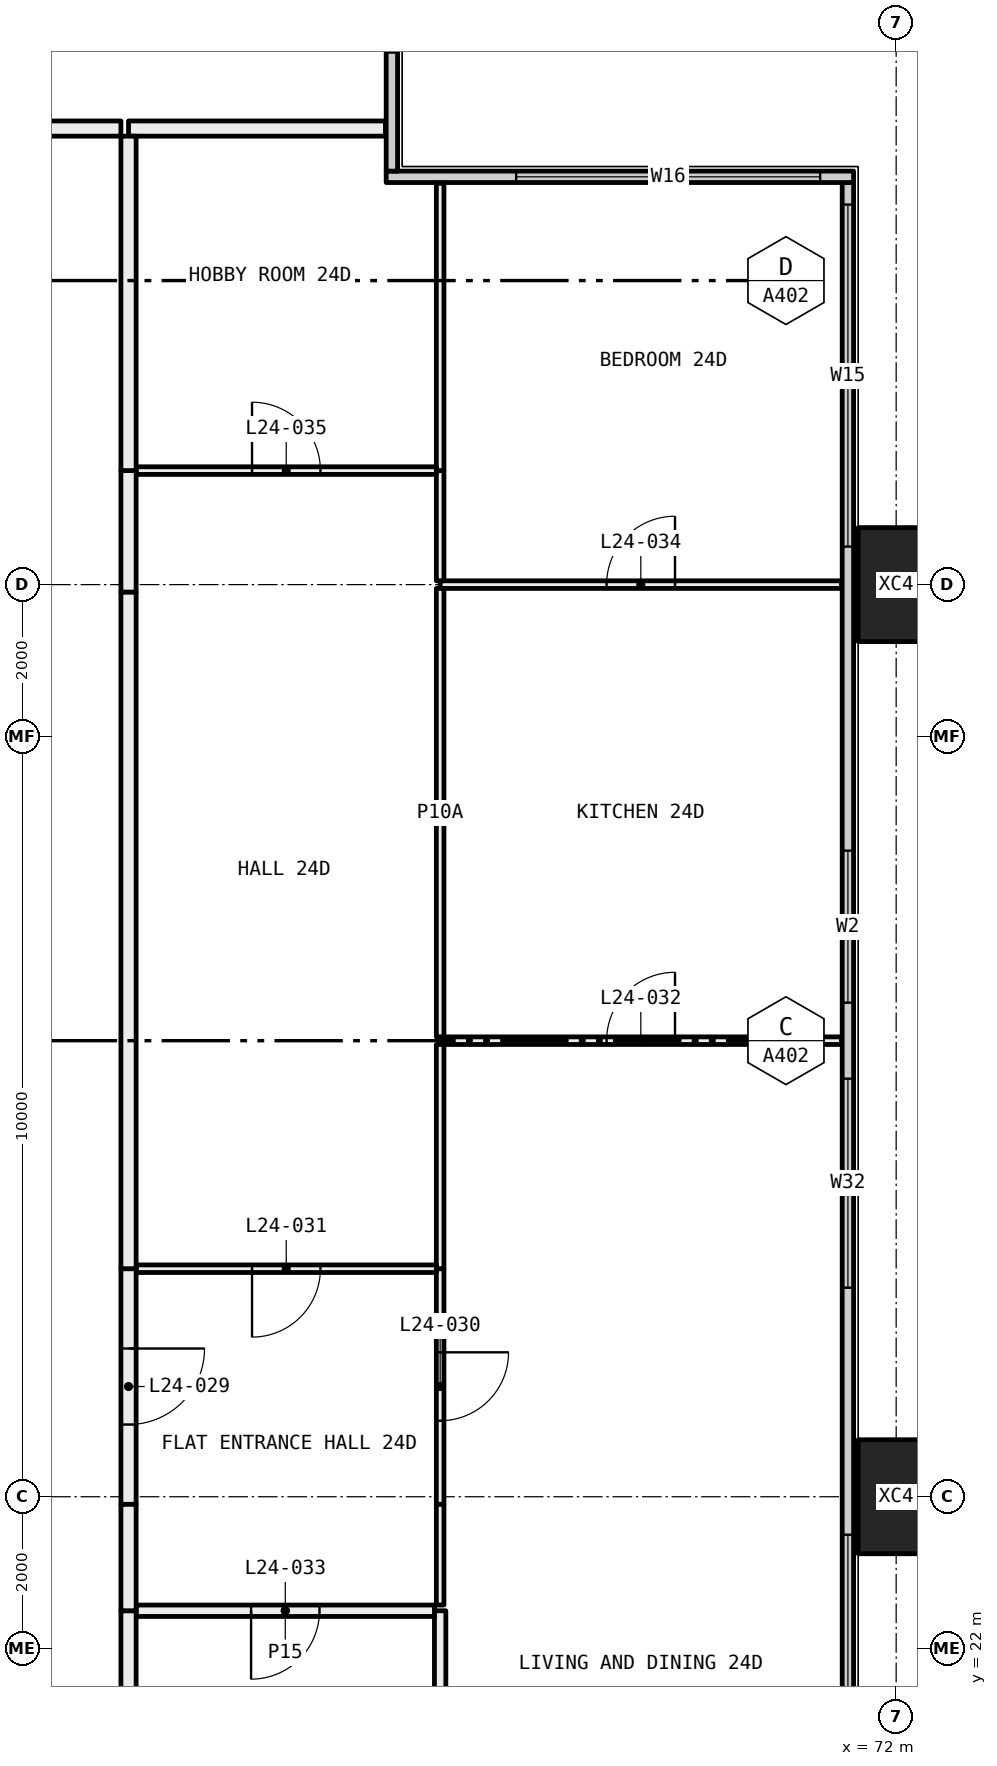
"""IFC4 building model, lengths in metres.
Left out: names, types, materials, properties, quantities, classifications, styles, units other than length and angle.
Written with IfcOpenShell. Run it as: python <this file> out.ifc"""

import sys

from ifc_helpers import new_model, si_unit, direction, frame, frame_2d, origin, origin_2d, place, context, subcontext, project, spatial, rectangle, hollow_rectangle, extrude, element, fill, save


model = new_model("IFC4")
c1 = context("Model", 3, precision=1e-05, world=origin(), true_north=direction((0.0, 1.0)))
c2 = subcontext(c1, "Body", "Model", "MODEL_VIEW")
j1 = project(units=[si_unit("LENGTHUNIT", "METRE"), si_unit("PLANEANGLEUNIT", "RADIAN")], contexts=[c1])
p1 = place(None, origin())
s1 = spatial("IfcSite", under=j1, at=p1, CompositionType="ELEMENT")
p2 = place(p1, origin())
s2 = spatial("IfcBuilding", under=s1, at=p2, CompositionType="ELEMENT")
p3 = place(p2, frame((0.0, 0.0, 96.6)))
s3 = spatial("IfcBuildingStorey", under=s2, at=p3, CompositionType="ELEMENT", Elevation=96.6)
for number, where, z_axis, x_axis in (
    (1, (72.0, 24.0, -0.4), (0.0, 0.0, 1.0), (0.0, 1.0, 0.0)),
    (2, (72.0, 36.0, -0.4), (0.0, 0.0, 1.0), (0.0, 1.0, 0.0)),
):
    element("IfcColumn", number, at=place(p3, frame(where, z_axis=z_axis, x_axis=x_axis)), inside=s3, PredefinedType="COLUMN", context=c2, shape_type="SweptSolid", body=[
        extrude(hollow_rectangle(XDim=1.5, YDim=1.0, WallThickness=0.06, at=origin_2d()), origin(), (0.0, 0.0, 1.0), 3.45),
    ])
p4 = place(p3, frame((71.365, 18.71, 0.0), z_axis=(0.0, 0.0, 1.0), x_axis=(0.0, 1.0, 0.0)))
e3 = element("IfcWall", 3, at=p4, inside=s3, PredefinedType="ELEMENTEDWALL", context=c2, shape_type="SweptSolid", body=[
    extrude(rectangle(XDim=22.58, YDim=0.15, at=frame_2d((11.29, 0.0))), origin(), (0.0, 0.0, 1.0), 3.05),
])
p5 = place(p4, frame((0.29, 0.0, 0.45)))
e4 = element("IfcOpeningElement", 4, at=p5, cuts=e3, PredefinedType="OPENING", context=c2, shape_type="SweptSolid", body=[
    extrude(rectangle(XDim=4.5, YDim=2.55, at=frame_2d((2.25, 1.275))), frame((0.0, 0.085, 0.0), z_axis=(0.0, -1.0, 0.0), x_axis=(1.0, 0.0, 0.0)), (0.0, 0.0, 1.0), 0.17),
])
p6 = place(p4, frame((8.04, 0.0, 0.45)))
e5 = element("IfcOpeningElement", 5, at=p6, cuts=e3, PredefinedType="OPENING", context=c2, shape_type="SweptSolid", body=[
    extrude(rectangle(XDim=2.75, YDim=2.55, at=frame_2d((1.375, 1.275))), frame((0.0, 0.085, 0.0), z_axis=(0.0, -1.0, 0.0), x_axis=(1.0, 0.0, 0.0)), (0.0, 0.0, 1.0), 0.17),
])
p7 = place(p4, frame((11.79, 0.0, 0.45)))
e6 = element("IfcOpeningElement", 6, at=p7, cuts=e3, PredefinedType="OPENING", context=c2, shape_type="SweptSolid", body=[
    extrude(rectangle(XDim=2.0, YDim=2.55, at=frame_2d((1.0, 1.275))), frame((0.0, 0.085, 0.0), z_axis=(0.0, -1.0, 0.0), x_axis=(1.0, 0.0, 0.0)), (0.0, 0.0, 1.0), 0.17),
])
p8 = place(p4, frame((17.79, 0.0, 0.45)))
e7 = element("IfcOpeningElement", 7, at=p8, cuts=e3, PredefinedType="OPENING", context=c2, shape_type="SweptSolid", body=[
    extrude(rectangle(XDim=4.5, YDim=2.55, at=frame_2d((2.25, 1.275))), frame((0.0, 0.085, 0.0), z_axis=(0.0, -1.0, 0.0), x_axis=(1.0, 0.0, 0.0)), (0.0, 0.0, 1.0), 0.17),
])
p9 = place(p3, frame((65.29, 41.365, 0.0), z_axis=(0.0, 0.0, 1.0), x_axis=(1.0, 0.0, 0.0)))
e8 = element("IfcWall", 8, at=p9, inside=s3, PredefinedType="ELEMENTEDWALL", context=c2, shape_type="SweptSolid", body=[
    extrude(rectangle(XDim=6.15, YDim=0.15, at=frame_2d((3.075, 0.0))), origin(), (0.0, 0.0, 1.0), 3.05),
])
p10 = place(p9, frame((1.71, 0.0, 0.45)))
e9 = element("IfcOpeningElement", 9, at=p10, cuts=e8, PredefinedType="OPENING", context=c2, shape_type="SweptSolid", body=[
    extrude(rectangle(XDim=4.0, YDim=2.55, at=frame_2d((2.0, 1.275))), frame((0.0, 0.085, 0.0), z_axis=(0.0, -1.0, 0.0), x_axis=(1.0, 0.0, 0.0)), (0.0, 0.0, 1.0), 0.17),
])
p11 = place(p3, frame((65.365, 41.44, 0.0), z_axis=(0.0, 0.0, 1.0), x_axis=(0.0, 1.0, 0.0)))
e10 = element("IfcWall", 10, at=p11, inside=s3, PredefinedType="ELEMENTEDWALL", context=c2, shape_type="SweptSolid", body=[
    extrude(rectangle(XDim=5.85, YDim=0.15, at=frame_2d((2.925, 0.0))), origin(), (0.0, 0.0, 1.0), 3.05),
])
p12 = place(p11, frame((1.56, 0.0, 0.45)))
e11 = element("IfcOpeningElement", 11, at=p12, cuts=e10, PredefinedType="OPENING", context=c2, shape_type="SweptSolid", body=[
    extrude(rectangle(XDim=4.0, YDim=2.55, at=frame_2d((2.0, 1.275))), frame((0.0, 0.085, 0.0), z_axis=(0.0, -1.0, 0.0), x_axis=(1.0, 0.0, 0.0)), (0.0, 0.0, 1.0), 0.17),
])
p13 = place(p3, frame((71.28, 30.0, 0.0), z_axis=(0.0, 0.0, 1.0), x_axis=(-1.0, 0.0, 0.0)))
e12 = element("IfcWall", 12, at=p13, inside=s3, PredefinedType="PARTITIONING", context=c2, shape_type="SweptSolid", body=[
    extrude(rectangle(XDim=5.28, YDim=0.1, at=frame_2d((2.64, 0.0))), origin(), (0.0, 0.0, 1.0), 3.05),
])
p14 = place(p13, frame((2.19, 0.0, 0.0)))
e13 = element("IfcOpeningElement", 13, at=p14, cuts=e12, PredefinedType="OPENING", context=c2, shape_type="SweptSolid", body=[
    extrude(rectangle(XDim=0.9, YDim=2.1, at=frame_2d((0.45, 1.05))), frame((0.0, 0.06, 0.0), z_axis=(0.0, -1.0, 0.0), x_axis=(1.0, 0.0, 0.0)), (0.0, 0.0, 1.0), 0.12),
])
p15 = place(p3, frame((66.0, 22.5, 0.0), z_axis=(0.0, 0.0, 1.0), x_axis=(0.0, -1.0, 0.0)))
e14 = element("IfcWall", 14, at=p15, inside=s3, PredefinedType="PARTITIONING", context=c2, shape_type="SweptSolid", body=[
    extrude(rectangle(XDim=3.78, YDim=0.15, at=frame_2d((1.89, 0.0))), origin(), (0.0, 0.0, 1.0), 3.05),
])
p16 = place(p3, frame((66.0, 27.0, 0.0), z_axis=(0.0, 0.0, 1.0), x_axis=(0.0, -1.0, 0.0)))
e15 = element("IfcWall", 15, at=p16, inside=s3, PredefinedType="PARTITIONING", context=c2, shape_type="SweptSolid", body=[
    extrude(rectangle(XDim=3.1, YDim=0.1, at=frame_2d((1.55, 0.0))), origin(), (0.0, 0.0, 1.0), 2.45),
])
p17 = place(p16, frame((1.1, 0.0, 0.0)))
e16 = element("IfcOpeningElement", 16, at=p17, cuts=e15, PredefinedType="OPENING", context=c2, shape_type="SweptSolid", body=[
    extrude(rectangle(XDim=0.9, YDim=2.1, at=frame_2d((0.45, 1.05))), frame((0.0, 0.06, 0.0), z_axis=(0.0, -1.0, 0.0), x_axis=(1.0, 0.0, 0.0)), (0.0, 0.0, 1.0), 0.12),
])
p18 = place(p3, frame((66.0, 23.9, 0.0), z_axis=(0.0, 0.0, 1.0), x_axis=(0.0, -1.0, 0.0)))
e17 = element("IfcWall", 17, at=p18, inside=s3, PredefinedType="PARTITIONING", context=c2, shape_type="SweptSolid", body=[
    extrude(rectangle(XDim=1.325, YDim=0.1, at=frame_2d((0.663, 0.0))), origin(), (0.0, 0.0, 1.0), 3.05),
])
p19 = place(p3, frame((66.0, 29.95, 0.0), z_axis=(0.0, 0.0, 1.0), x_axis=(0.0, -1.0, 0.0)))
e18 = element("IfcWall", 18, at=p19, inside=s3, PredefinedType="PARTITIONING", context=c2, shape_type="SweptSolid", body=[
    extrude(rectangle(XDim=2.95, YDim=0.1, at=frame_2d((1.475, 0.0))), origin(), (0.0, 0.0, 1.0), 3.05),
])
p20 = place(p3, frame((71.28, 36.0, 0.0), z_axis=(0.0, 0.0, 1.0), x_axis=(-1.0, 0.0, 0.0)))
e19 = element("IfcWall", 19, at=p20, inside=s3, PredefinedType="PARTITIONING", context=c2, shape_type="SweptSolid", body=[
    extrude(rectangle(XDim=5.28, YDim=0.1, at=frame_2d((2.64, 0.0))), origin(), (0.0, 0.0, 1.0), 2.45),
])
p21 = place(p20, frame((2.19, 0.0, 0.0)))
e20 = element("IfcOpeningElement", 20, at=p21, cuts=e19, PredefinedType="OPENING", context=c2, shape_type="SweptSolid", body=[
    extrude(rectangle(XDim=0.9, YDim=2.1, at=frame_2d((0.45, 1.05))), frame((0.0, 0.06, 0.0), z_axis=(0.0, -1.0, 0.0), x_axis=(1.0, 0.0, 0.0)), (0.0, 0.0, 1.0), 0.12),
])
p22 = place(p3, frame((66.0, 35.95, 0.0), z_axis=(0.0, 0.0, 1.0), x_axis=(0.0, -1.0, 0.0)))
e21 = element("IfcWall", 21, at=p22, inside=s3, PredefinedType="PARTITIONING", context=c2, shape_type="SweptSolid", body=[
    extrude(rectangle(XDim=5.9, YDim=0.1, at=frame_2d((2.95, 0.0))), origin(), (0.0, 0.0, 1.0), 2.45),
])
p23 = place(p3, frame((66.0, 37.5, 0.0), z_axis=(0.0, 0.0, 1.0), x_axis=(0.0, -1.0, 0.0)))
e22 = element("IfcWall", 22, at=p23, inside=s3, PredefinedType="PARTITIONING", context=c2, shape_type="SweptSolid", body=[
    extrude(rectangle(XDim=1.45, YDim=0.1, at=frame_2d((0.725, 0.0))), origin(), (0.0, 0.0, 1.0), 2.45),
])
p24 = place(p3, frame((66.0, 41.28, 0.0), z_axis=(0.0, 0.0, 1.0), x_axis=(0.0, -1.0, 0.0)))
e23 = element("IfcWall", 23, at=p24, inside=s3, PredefinedType="PARTITIONING", context=c2, shape_type="SweptSolid", body=[
    extrude(rectangle(XDim=3.78, YDim=0.1, at=frame_2d((1.89, 0.0))), origin(), (0.0, 0.0, 1.0), 3.05),
])
p25 = place(p3, frame((65.925, 22.5, 0.0), z_axis=(0.0, 0.0, 1.0), x_axis=(-1.0, 0.0, 0.0)))
e24 = element("IfcWall", 24, at=p25, inside=s3, PredefinedType="PARTITIONING", context=c2, shape_type="SweptSolid", body=[
    extrude(rectangle(XDim=3.925, YDim=0.15, at=frame_2d((1.962, 0.0))), origin(), (0.0, 0.0, 1.0), 3.05),
])
p26 = place(p25, frame((1.512, 0.0, 0.0)))
e25 = element("IfcOpeningElement", 25, at=p26, cuts=e24, PredefinedType="OPENING", context=c2, shape_type="SweptSolid", body=[
    extrude(rectangle(XDim=0.9, YDim=2.1, at=frame_2d((0.45, 1.05))), frame((0.0, 0.085, 0.0), z_axis=(0.0, -1.0, 0.0), x_axis=(1.0, 0.0, 0.0)), (0.0, 0.0, 1.0), 0.17),
])
p27 = place(p3, frame((61.9, 22.5, 0.0), z_axis=(0.0, 0.0, 1.0), x_axis=(0.0, -1.0, 0.0)))
e26 = element("IfcWall", 26, at=p27, inside=s3, PredefinedType="PARTITIONING", context=c2, shape_type="SweptSolid", body=[
    extrude(rectangle(XDim=4.4, YDim=0.2, at=frame_2d((2.2, 0.0))), origin(), (0.0, 0.0, 1.0), 3.05),
])
p28 = place(p3, frame((65.95, 27.0, 0.0), z_axis=(0.0, 0.0, 1.0), x_axis=(-1.0, 0.0, 0.0)))
e27 = element("IfcWall", 27, at=p28, inside=s3, PredefinedType="PARTITIONING", context=c2, shape_type="SweptSolid", body=[
    extrude(rectangle(XDim=3.95, YDim=0.1, at=frame_2d((1.975, 0.0))), origin(), (0.0, 0.0, 1.0), 3.05),
])
p29 = place(p28, frame((1.525, 0.0, 0.0)))
e28 = element("IfcOpeningElement", 28, at=p29, cuts=e27, PredefinedType="OPENING", context=c2, shape_type="SweptSolid", body=[
    extrude(rectangle(XDim=0.9, YDim=2.1, at=frame_2d((0.45, 1.05))), frame((0.0, 0.06, 0.0), z_axis=(0.0, -1.0, 0.0), x_axis=(1.0, 0.0, 0.0)), (0.0, 0.0, 1.0), 0.12),
])
p30 = place(p3, frame((61.9, 27.0, 0.0), z_axis=(0.0, 0.0, 1.0), x_axis=(0.0, -1.0, 0.0)))
e29 = element("IfcWall", 29, at=p30, inside=s3, PredefinedType="PARTITIONING", context=c2, shape_type="SweptSolid", body=[
    extrude(rectangle(XDim=3.1, YDim=0.2, at=frame_2d((1.55, 0.0))), origin(), (0.0, 0.0, 1.0), 2.45),
])
p31 = place(p30, frame((1.05, 0.0, 0.0)))
e30 = element("IfcOpeningElement", 30, at=p31, cuts=e29, PredefinedType="OPENING", context=c2, shape_type="SweptSolid", body=[
    extrude(rectangle(XDim=1.0, YDim=2.1, at=frame_2d((0.5, 1.05))), frame((0.0, 0.11, 0.0), z_axis=(0.0, -1.0, 0.0), x_axis=(1.0, 0.0, 0.0)), (0.0, 0.0, 1.0), 0.22),
])
p32 = place(p3, frame((61.9, 23.9, 0.0), z_axis=(0.0, 0.0, 1.0), x_axis=(0.0, -1.0, 0.0)))
e31 = element("IfcWall", 31, at=p32, inside=s3, PredefinedType="PARTITIONING", context=c2, shape_type="SweptSolid", body=[
    extrude(rectangle(XDim=1.4, YDim=0.2, at=frame_2d((0.7, 0.0))), origin(), (0.0, 0.0, 1.0), 3.05),
])
p33 = place(p3, frame((65.95, 37.5, 0.0), z_axis=(0.0, 0.0, 1.0), x_axis=(-1.0, 0.0, 0.0)))
e32 = element("IfcWall", 32, at=p33, inside=s3, PredefinedType="PARTITIONING", context=c2, shape_type="SweptSolid", body=[
    extrude(rectangle(XDim=3.95, YDim=0.1, at=frame_2d((1.975, 0.0))), origin(), (0.0, 0.0, 1.0), 3.05),
])
p34 = place(p33, frame((1.525, 0.0, 0.0)))
e33 = element("IfcOpeningElement", 33, at=p34, cuts=e32, PredefinedType="OPENING", context=c2, shape_type="SweptSolid", body=[
    extrude(rectangle(XDim=0.9, YDim=2.1, at=frame_2d((0.45, 1.05))), frame((0.0, 0.06, 0.0), z_axis=(0.0, -1.0, 0.0), x_axis=(1.0, 0.0, 0.0)), (0.0, 0.0, 1.0), 0.12),
])
p35 = place(p3, frame((61.9, 37.5, 0.0), z_axis=(0.0, 0.0, 1.0), x_axis=(0.0, -1.0, 0.0)))
e34 = element("IfcWall", 34, at=p35, inside=s3, PredefinedType="PARTITIONING", context=c2, shape_type="SweptSolid", body=[
    extrude(rectangle(XDim=1.6, YDim=0.2, at=frame_2d((0.8, 0.0))), origin(), (0.0, 0.0, 1.0), 2.45),
])
p36 = place(p3, frame((61.9, 35.9, 0.0), z_axis=(0.0, 0.0, 1.0), x_axis=(0.0, -1.0, 0.0)))
e35 = element("IfcWall", 35, at=p36, inside=s3, PredefinedType="PARTITIONING", context=c2, shape_type="SweptSolid", body=[
    extrude(rectangle(XDim=8.9, YDim=0.2, at=frame_2d((4.45, 0.0))), origin(), (0.0, 0.0, 1.0), 3.05),
])
p37 = place(p3, frame((65.28, 42.0, 0.0), z_axis=(0.0, 0.0, 1.0), x_axis=(-1.0, 0.0, 0.0)))
e36 = element("IfcWall", 36, at=p37, inside=s3, PredefinedType="PARTITIONING", context=c2, shape_type="SweptSolid", body=[
    extrude(rectangle(XDim=3.38, YDim=0.2, at=frame_2d((1.69, 0.0))), origin(), (0.0, 0.0, 1.0), 3.05),
])
p38 = place(p3, frame((61.9, 41.9, 0.0), z_axis=(0.0, 0.0, 1.0), x_axis=(0.0, -1.0, 0.0)))
e37 = element("IfcWall", 37, at=p38, inside=s3, PredefinedType="PARTITIONING", context=c2, shape_type="SweptSolid", body=[
    extrude(rectangle(XDim=4.4, YDim=0.2, at=frame_2d((2.2, 0.0))), origin(), (0.0, 0.0, 1.0), 3.05),
])
p39 = place(p3, frame((60.0, 42.0, 0.0), z_axis=(0.0, 0.0, 1.0), x_axis=(1.0, 0.0, 0.0)))
e38 = element("IfcWall", 38, at=p39, inside=s3, PredefinedType="PARTITIONING", context=c2, shape_type="SweptSolid", body=[
    extrude(rectangle(XDim=1.8, YDim=0.2, at=frame_2d((0.9, 0.0))), origin(), (0.0, 0.0, 1.0), 3.05),
])
p40 = place(p5, origin())
e39 = element("IfcWindow", 39, at=p40, inside=s3, PartitioningType="SINGLE_PANEL", PredefinedType="WINDOW", context=c2, shape_type="SweptSolid", body=[
    extrude(rectangle(XDim=4.5, YDim=2.55, at=frame_2d((2.25, 1.275))), frame((0.0, 0.03, 0.0), z_axis=(0.0, -1.0, 0.0), x_axis=(1.0, 0.0, 0.0)), (0.0, 0.0, 1.0), 0.06),
])
fill(e4, e39)
p41 = place(p6, origin())
e40 = element("IfcWindow", 40, at=p41, inside=s3, PartitioningType="SINGLE_PANEL", PredefinedType="WINDOW", context=c2, shape_type="SweptSolid", body=[
    extrude(rectangle(XDim=2.75, YDim=2.55, at=frame_2d((1.375, 1.275))), frame((0.0, 0.03, 0.0), z_axis=(0.0, -1.0, 0.0), x_axis=(1.0, 0.0, 0.0)), (0.0, 0.0, 1.0), 0.06),
])
fill(e5, e40)
p42 = place(p7, origin())
e41 = element("IfcWindow", 41, at=p42, inside=s3, PartitioningType="SINGLE_PANEL", PredefinedType="WINDOW", context=c2, shape_type="SweptSolid", body=[
    extrude(rectangle(XDim=2.0, YDim=2.55, at=frame_2d((1.0, 1.275))), frame((0.0, 0.03, 0.0), z_axis=(0.0, -1.0, 0.0), x_axis=(1.0, 0.0, 0.0)), (0.0, 0.0, 1.0), 0.06),
])
fill(e6, e41)
p43 = place(p8, origin())
e42 = element("IfcWindow", 42, at=p43, inside=s3, PartitioningType="SINGLE_PANEL", PredefinedType="WINDOW", context=c2, shape_type="SweptSolid", body=[
    extrude(rectangle(XDim=4.5, YDim=2.55, at=frame_2d((2.25, 1.275))), frame((0.0, 0.03, 0.0), z_axis=(0.0, -1.0, 0.0), x_axis=(1.0, 0.0, 0.0)), (0.0, 0.0, 1.0), 0.06),
])
fill(e7, e42)
p44 = place(p10, origin())
e43 = element("IfcWindow", 43, at=p44, inside=s3, PartitioningType="SINGLE_PANEL", PredefinedType="WINDOW", context=c2, shape_type="SweptSolid", body=[
    extrude(rectangle(XDim=4.0, YDim=2.55, at=frame_2d((2.0, 1.275))), frame((0.0, 0.03, 0.0), z_axis=(0.0, -1.0, 0.0), x_axis=(1.0, 0.0, 0.0)), (0.0, 0.0, 1.0), 0.06),
])
fill(e9, e43)
p45 = place(p31, origin())
e44 = element("IfcDoor", 44, at=p45, inside=s3, OperationType="SINGLE_SWING_RIGHT", PredefinedType="DOOR", context=c2, shape_type="SweptSolid", body=[
    extrude(rectangle(XDim=1.0, YDim=2.1, at=frame_2d((0.5, 1.05))), frame((0.0, 0.025, 0.0), z_axis=(0.0, -1.0, 0.0), x_axis=(1.0, 0.0, 0.0)), (0.0, 0.0, 1.0), 0.05),
])
fill(e30, e44)
p46 = place(p17, origin())
e45 = element("IfcDoor", 45, at=p46, inside=s3, OperationType="SINGLE_SWING_RIGHT", PredefinedType="DOOR", context=c2, shape_type="SweptSolid", body=[
    extrude(rectangle(XDim=0.9, YDim=2.1, at=frame_2d((0.45, 1.05))), frame((0.0, 0.025, 0.0), z_axis=(0.0, -1.0, 0.0), x_axis=(1.0, 0.0, 0.0)), (0.0, 0.0, 1.0), 0.05),
])
fill(e16, e45)
p47 = place(p29, origin())
e46 = element("IfcDoor", 46, at=p47, inside=s3, OperationType="SINGLE_SWING_LEFT", PredefinedType="DOOR", context=c2, shape_type="SweptSolid", body=[
    extrude(rectangle(XDim=0.9, YDim=2.1, at=frame_2d((0.45, 1.05))), frame((0.0, 0.025, 0.0), z_axis=(0.0, -1.0, 0.0), x_axis=(1.0, 0.0, 0.0)), (0.0, 0.0, 1.0), 0.05),
])
fill(e28, e46)
p48 = place(p14, frame((0.9, 0.0, 0.0), x_axis=(-1.0, 0.0, 0.0)))
e47 = element("IfcDoor", 47, at=p48, inside=s3, OperationType="SINGLE_SWING_LEFT", PredefinedType="DOOR", context=c2, shape_type="SweptSolid", body=[
    extrude(rectangle(XDim=0.9, YDim=2.1, at=frame_2d((0.45, 1.05))), frame((0.0, 0.025, 0.0), z_axis=(0.0, -1.0, 0.0), x_axis=(1.0, 0.0, 0.0)), (0.0, 0.0, 1.0), 0.05),
])
fill(e13, e47)
p49 = place(p26, origin())
e48 = element("IfcDoor", 48, at=p49, inside=s3, OperationType="SINGLE_SWING_LEFT", PredefinedType="DOOR", context=c2, shape_type="SweptSolid", body=[
    extrude(rectangle(XDim=0.9, YDim=2.1, at=frame_2d((0.45, 1.05))), frame((0.0, 0.025, 0.0), z_axis=(0.0, -1.0, 0.0), x_axis=(1.0, 0.0, 0.0)), (0.0, 0.0, 1.0), 0.05),
])
fill(e25, e48)
p50 = place(p21, frame((0.9, 0.0, 0.0), x_axis=(-1.0, 0.0, 0.0)))
e49 = element("IfcDoor", 49, at=p50, inside=s3, OperationType="SINGLE_SWING_LEFT", PredefinedType="DOOR", context=c2, shape_type="SweptSolid", body=[
    extrude(rectangle(XDim=0.9, YDim=2.1, at=frame_2d((0.45, 1.05))), frame((0.0, 0.025, 0.0), z_axis=(0.0, -1.0, 0.0), x_axis=(1.0, 0.0, 0.0)), (0.0, 0.0, 1.0), 0.05),
])
fill(e20, e49)
p51 = place(p34, frame((0.9, 0.0, 0.0), x_axis=(-1.0, 0.0, 0.0)))
e50 = element("IfcDoor", 50, at=p51, inside=s3, OperationType="SINGLE_SWING_RIGHT", PredefinedType="DOOR", context=c2, shape_type="SweptSolid", body=[
    extrude(rectangle(XDim=0.9, YDim=2.1, at=frame_2d((0.45, 1.05))), frame((0.0, 0.025, 0.0), z_axis=(0.0, -1.0, 0.0), x_axis=(1.0, 0.0, 0.0)), (0.0, 0.0, 1.0), 0.05),
])
fill(e33, e50)
save(model, sys.argv[1])
